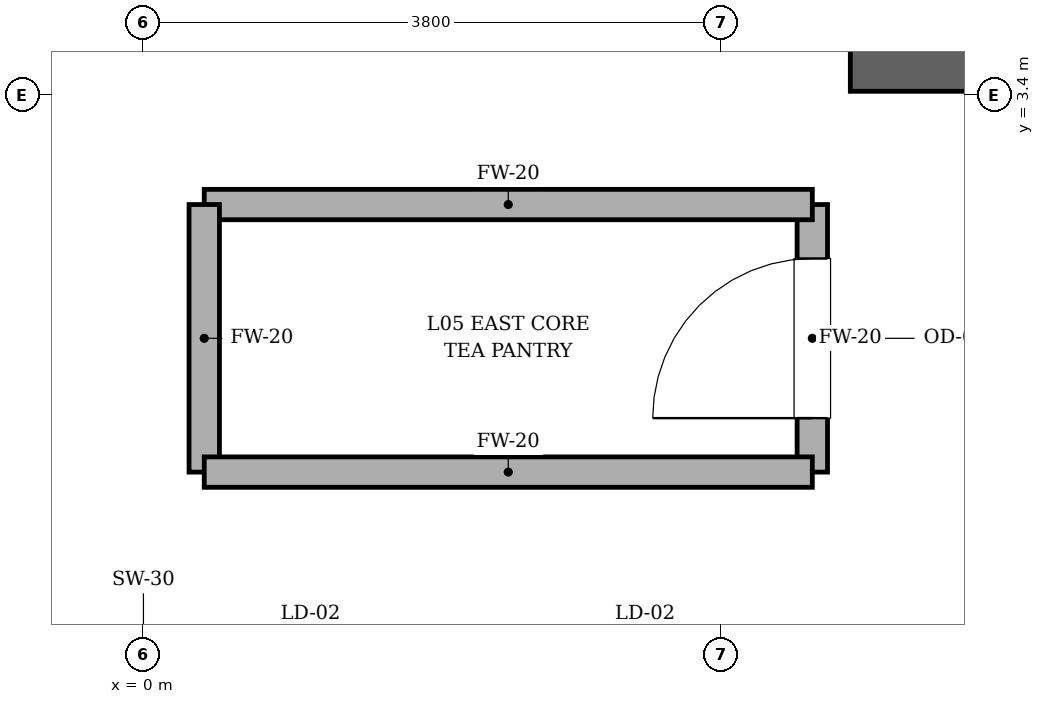
"""IFC4 building model, lengths in metres.
Left out: names, types, materials, properties, quantities, classifications, styles, units other than length and angle.
Written with IfcOpenShell. Run it as: python <this file> out.ifc"""

import sys

from ifc_helpers import new_model, si_unit, direction, frame, frame_2d, origin, place, context, subcontext, project, spatial, rectangle, extrude, element, fill, save


model = new_model("IFC4")
c1 = context("Model", 3, precision=1e-05, world=origin(), true_north=direction((0.0, 1.0)))
c2 = subcontext(c1, "Body", "Model", "MODEL_VIEW")
j1 = project(units=[si_unit("LENGTHUNIT", "METRE"), si_unit("PLANEANGLEUNIT", "RADIAN")], contexts=[c1])
p1 = place(None, origin())
s1 = spatial("IfcSite", under=j1, at=p1, CompositionType="ELEMENT")
p2 = place(p1, origin())
s2 = spatial("IfcBuilding", under=s1, at=p2, CompositionType="ELEMENT")
p3 = place(p2, frame((0.0, 0.0, 28.2)))
s3 = spatial("IfcBuildingStorey", under=s2, at=p3, CompositionType="ELEMENT", Elevation=28.2)
p4 = place(p3, frame((4.65, 3.6, 0.0), z_axis=(0.0, 0.0, 1.0), x_axis=(1.0, 0.0, 0.0)))
e1 = element("IfcWall", 1, at=p4, inside=s3, PredefinedType="SOLIDWALL", context=c2, shape_type="SweptSolid", body=[
    extrude(rectangle(XDim=5.175, YDim=0.35, at=frame_2d((2.587, 0.0))), origin(), (0.0, 0.0, 1.0), 4.05),
])
p5 = place(p3, frame((4.4, 0.92, 0.0), z_axis=(0.0, 0.0, 1.0), x_axis=(0.0, 1.0, 0.0)))
e2 = element("IfcWall", 2, at=p5, inside=s3, PredefinedType="SOLIDWALL", context=c2, shape_type="SweptSolid", body=[
    extrude(rectangle(XDim=1.76, YDim=0.2, at=frame_2d((0.88, 0.0))), origin(), (0.0, 0.0, 1.0), 3.81),
])
p6 = place(p5, frame((0.355, 0.0, 0.0)))
e3 = element("IfcOpeningElement", 3, at=p6, cuts=e2, PredefinedType="OPENING", context=c2, shape_type="SweptSolid", body=[
    extrude(rectangle(XDim=1.05, YDim=2.2, at=frame_2d((0.525, 1.1))), frame((0.0, 0.11, 0.0), z_axis=(0.0, -1.0, 0.0), x_axis=(1.0, 0.0, 0.0)), (0.0, 0.0, 1.0), 0.22),
])
p7 = place(p3, frame((4.4, 2.68, 0.0), z_axis=(0.0, 0.0, 1.0), x_axis=(-1.0, 0.0, 0.0)))
e4 = element("IfcWall", 4, at=p7, inside=s3, PredefinedType="SOLIDWALL", context=c2, shape_type="SweptSolid", body=[
    extrude(rectangle(XDim=4.0, YDim=0.2, at=frame_2d((2.0, 0.0))), origin(), (0.0, 0.0, 1.0), 3.81),
])
p8 = place(p3, frame((0.4, 2.68, 0.0), z_axis=(0.0, 0.0, 1.0), x_axis=(0.0, -1.0, 0.0)))
e5 = element("IfcWall", 5, at=p8, inside=s3, PredefinedType="SOLIDWALL", context=c2, shape_type="SweptSolid", body=[
    extrude(rectangle(XDim=1.76, YDim=0.2, at=frame_2d((0.88, 0.0))), origin(), (0.0, 0.0, 1.0), 3.81),
])
p9 = place(p3, frame((0.4, 0.92, 0.0), z_axis=(0.0, 0.0, 1.0), x_axis=(1.0, 0.0, 0.0)))
e6 = element("IfcWall", 6, at=p9, inside=s3, PredefinedType="SOLIDWALL", context=c2, shape_type="SweptSolid", body=[
    extrude(rectangle(XDim=4.0, YDim=0.2, at=frame_2d((2.0, 0.0))), origin(), (0.0, 0.0, 1.0), 3.81),
])
p10 = place(p6, origin())
e7 = element("IfcDoor", 7, at=p10, inside=s3, OperationType="SINGLE_SWING_LEFT", PredefinedType="DOOR", context=c2, shape_type="SweptSolid", body=[
    extrude(rectangle(XDim=1.05, YDim=2.2, at=frame_2d((0.525, 1.1))), frame((0.0, 0.025, 0.0), z_axis=(0.0, -1.0, 0.0), x_axis=(1.0, 0.0, 0.0)), (0.0, 0.0, 1.0), 0.05),
])
fill(e3, e7)
save(model, sys.argv[1])
